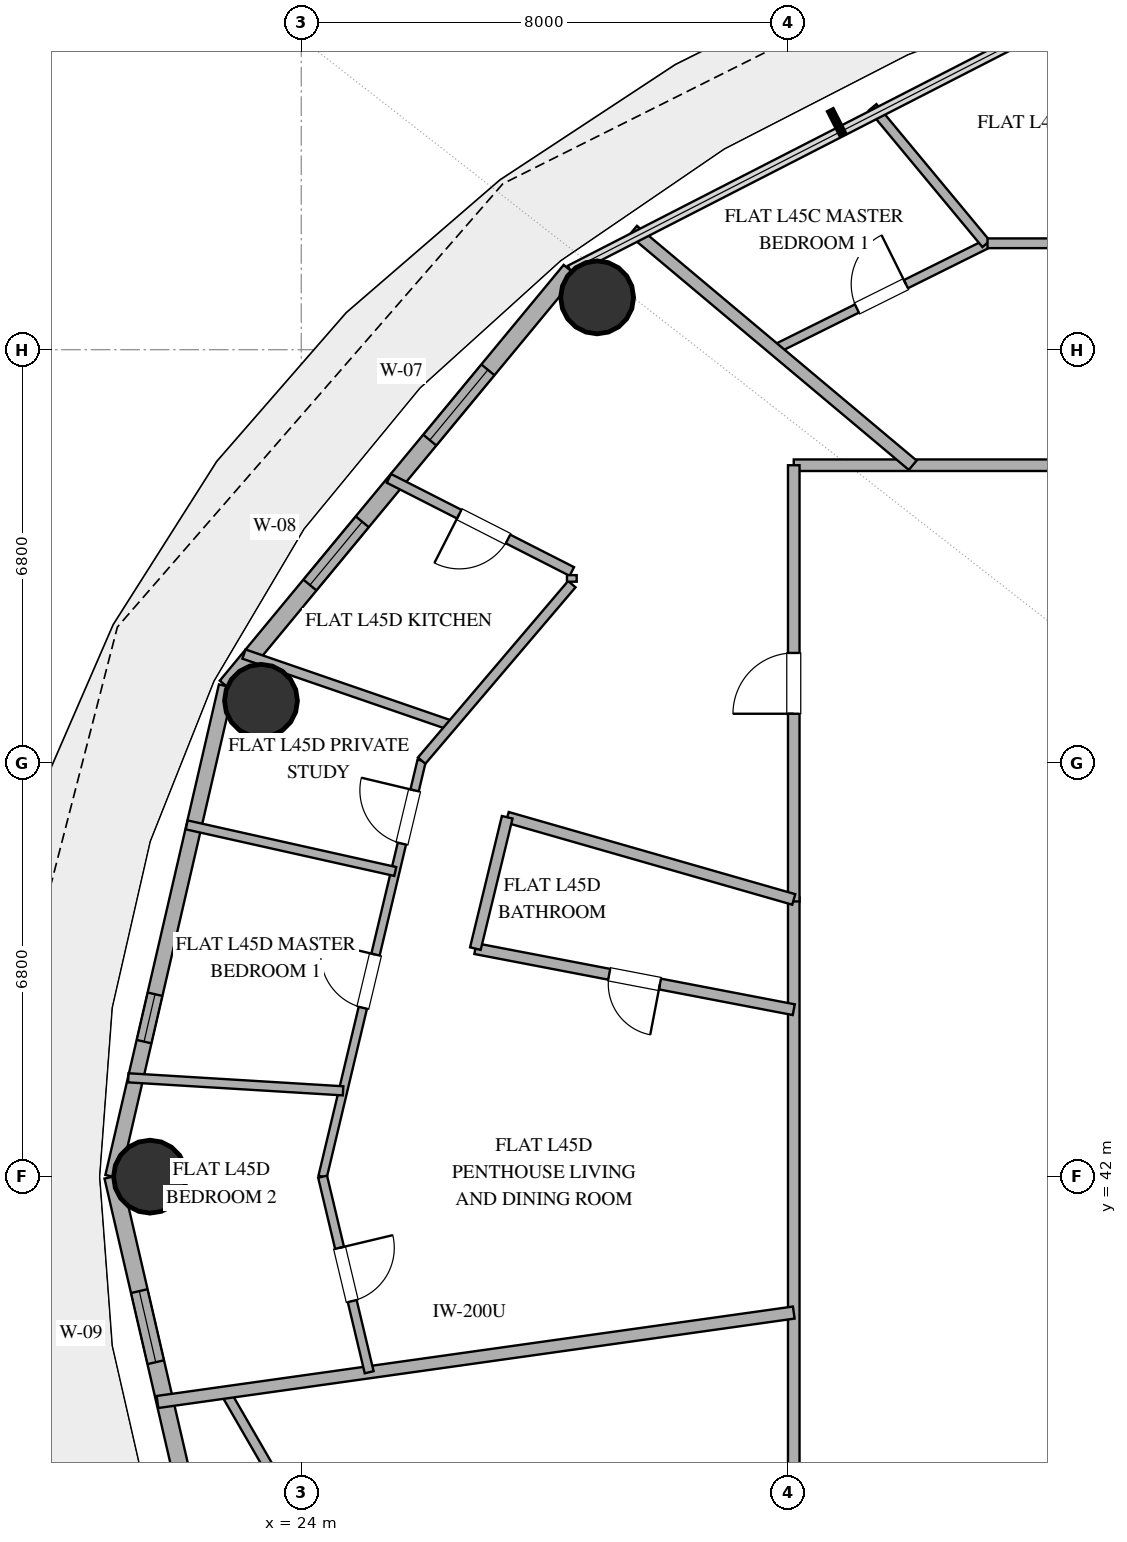
"""IFC4 building model, lengths in metres.
Left out: names, types, materials, properties, quantities, classifications, styles, units other than length and angle.
Written with IfcOpenShell. Run it as: python <this file> out.ifc"""

import sys

from ifc_helpers import new_model, si_unit, direction, frame, frame_2d, origin, origin_2d, place, context, subcontext, project, spatial, rectangle, hollow_circle, extrude, element, fill, save


model = new_model("IFC4")
c1 = context("Model", 3, precision=1e-05, world=origin(), true_north=direction((0.0, 1.0)))
c2 = subcontext(c1, "Body", "Model", "MODEL_VIEW")
j1 = project(units=[si_unit("LENGTHUNIT", "METRE"), si_unit("PLANEANGLEUNIT", "RADIAN")], contexts=[c1])
p1 = place(None, origin())
s1 = spatial("IfcSite", under=j1, at=p1, CompositionType="ELEMENT")
p2 = place(p1, origin())
s2 = spatial("IfcBuilding", under=s1, at=p2, CompositionType="ELEMENT")
p3 = place(p2, frame((0.0, 0.0, 179.4)))
s3 = spatial("IfcBuildingStorey", under=s2, at=p3, CompositionType="ELEMENT", Elevation=179.4)
for number, where, z_axis, x_axis in (
    (1, (28.866, 56.46, 0.0), (0.0, 0.0, 1.0), (1.0, 0.0, 0.0)),
    (2, (23.338, 49.826, 0.0), (0.0, 0.0, 1.0), (1.0, 0.0, 0.0)),
    (3, (21.513, 42.0, 0.0), (0.0, 0.0, 1.0), (1.0, 0.0, 0.0)),
):
    element("IfcColumn", number, at=place(p3, frame(where, z_axis=z_axis, x_axis=x_axis)), inside=s3, PredefinedType="COLUMN", context=c2, shape_type="SweptSolid", body=[
        extrude(hollow_circle(Radius=0.6, WallThickness=0.032, at=origin_2d()), origin(), (0.0, 0.0, 1.0), 3.38),
    ])
p4 = place(p3, frame((28.424, 56.906, 0.0), z_axis=(0.0, 0.0, 1.0), x_axis=(-0.637333477683, -0.770588111915, 0.0)))
e4 = element("IfcWall", 4, at=p4, inside=s3, PredefinedType="SOLIDWALL", context=c2, shape_type="SweptSolid", body=[
    extrude(rectangle(XDim=8.875, YDim=0.28, at=frame_2d((4.438, 0.0))), origin(), (0.0, 0.0, 1.0), 3.38),
])
p5 = place(p4, frame((2.125, 0.0, 0.85)))
e5 = element("IfcOpeningElement", 5, at=p5, cuts=e4, PredefinedType="OPENING", context=c2, shape_type="SweptSolid", body=[
    extrude(rectangle(XDim=1.5, YDim=1.8, at=frame_2d((0.75, 0.9))), frame((0.0, 0.15, 0.0), z_axis=(0.0, -1.0, 0.0), x_axis=(1.0, 0.0, 0.0)), (0.0, 0.0, 1.0), 0.3),
])
p6 = place(p4, frame((5.367, 0.0, 0.85)))
e6 = element("IfcOpeningElement", 6, at=p6, cuts=e4, PredefinedType="OPENING", context=c2, shape_type="SweptSolid", body=[
    extrude(rectangle(XDim=1.35, YDim=1.8, at=frame_2d((0.675, 0.9))), frame((0.0, 0.15, 0.0), z_axis=(0.0, -1.0, 0.0), x_axis=(1.0, 0.0, 0.0)), (0.0, 0.0, 1.0), 0.3),
])
p7 = place(p3, frame((22.768, 50.067, 0.0), z_axis=(0.0, 0.0, 1.0), x_axis=(-0.225473184558, -0.974249374157, 0.0)))
e7 = element("IfcWall", 7, at=p7, inside=s3, PredefinedType="SOLIDWALL", context=c2, shape_type="SweptSolid", body=[
    extrude(rectangle(XDim=8.28, YDim=0.25, at=frame_2d((4.14, 0.0))), origin(), (0.0, 0.0, 1.0), 3.38),
])
p8 = place(p7, frame((5.2, 0.0, 1.54)))
e8 = element("IfcOpeningElement", 8, at=p8, cuts=e7, PredefinedType="OPENING", context=c2, shape_type="SweptSolid", body=[
    extrude(rectangle(XDim=0.8, YDim=1.0, at=frame_2d((0.4, 0.5))), frame((0.0, 0.135, 0.0), z_axis=(0.0, -1.0, 0.0), x_axis=(1.0, 0.0, 0.0)), (0.0, 0.0, 1.0), 0.27),
])
p9 = place(p3, frame((20.901, 42.0, 0.0), z_axis=(0.0, 0.0, 1.0), x_axis=(0.225473184558, -0.974249374157, 0.0)))
e9 = element("IfcWall", 9, at=p9, inside=s3, PredefinedType="SOLIDWALL", context=c2, shape_type="SweptSolid", body=[
    extrude(rectangle(XDim=8.28, YDim=0.28, at=frame_2d((4.14, 0.0))), origin(), (0.0, 0.0, 1.0), 3.38),
])
p10 = place(p9, frame((1.932, 0.0, 0.85)))
e10 = element("IfcOpeningElement", 10, at=p10, cuts=e9, PredefinedType="OPENING", context=c2, shape_type="SweptSolid", body=[
    extrude(rectangle(XDim=1.2, YDim=1.8, at=frame_2d((0.6, 0.9))), frame((0.0, 0.15, 0.0), z_axis=(0.0, -1.0, 0.0), x_axis=(1.0, 0.0, 0.0)), (0.0, 0.0, 1.0), 0.3),
])
p11 = place(p9, frame((5.694, 0.0, 0.0)))
e11 = element("IfcOpeningElement", 11, at=p11, cuts=e9, PredefinedType="OPENING", context=c2, shape_type="SweptSolid", body=[
    extrude(rectangle(XDim=1.05, YDim=2.2, at=frame_2d((0.525, 1.1))), frame((0.0, 0.15, 0.0), z_axis=(0.0, -1.0, 0.0), x_axis=(1.0, 0.0, 0.0)), (0.0, 0.0, 1.0), 0.3),
])
p12 = place(p3, frame((32.1, 53.7, 0.0), z_axis=(0.0, 0.0, 1.0), x_axis=(1.0, 0.0, 0.0)))
e12 = element("IfcWall", 12, at=p12, inside=s3, PredefinedType="PARTITIONING", context=c2, shape_type="SweptSolid", body=[
    extrude(rectangle(XDim=16.061, YDim=0.19, at=frame_2d((8.03, 0.0))), origin(), (0.0, 0.0, 1.0), 2.74),
])
p13 = place(p12, frame((6.907, 0.0, 0.0)))
e13 = element("IfcOpeningElement", 13, at=p13, cuts=e12, PredefinedType="OPENING", context=c2, shape_type="SweptSolid", body=[
    extrude(rectangle(XDim=1.0, YDim=2.2, at=frame_2d((0.5, 1.1))), frame((0.0, 0.105, 0.0), z_axis=(0.0, -1.0, 0.0), x_axis=(1.0, 0.0, 0.0)), (0.0, 0.0, 1.0), 0.21),
])
p14 = place(p3, frame((22.753, 38.452, 0.0), z_axis=(0.0, 0.0, 1.0), x_axis=(0.500584533727, -0.865687659952, 0.0)))
e14 = element("IfcWall", 14, at=p14, inside=s3, PredefinedType="PLUMBINGWALL", context=c2, shape_type="SweptSolid", body=[
    extrude(rectangle(XDim=9.567, YDim=0.16, at=frame_2d((4.783, 0.0))), origin(), (0.0, 0.0, 1.0), 2.74),
])
p15 = place(p14, frame((5.233, 0.0, 0.0)))
e15 = element("IfcOpeningElement", 15, at=p15, cuts=e14, PredefinedType="OPENING", context=c2, shape_type="SweptSolid", body=[
    extrude(rectangle(XDim=0.9, YDim=2.1, at=frame_2d((0.45, 1.05))), frame((0.0, 0.09, 0.0), z_axis=(0.0, -1.0, 0.0), x_axis=(1.0, 0.0, 0.0)), (0.0, 0.0, 1.0), 0.18),
])
p16 = place(p3, frame((32.1, 46.593, 0.0), z_axis=(0.0, 0.0, 1.0), x_axis=(0.0, -1.0, 0.0)))
e16 = element("IfcWall", 16, at=p16, inside=s3, PredefinedType="PARTITIONING", context=c2, shape_type="SweptSolid", body=[
    extrude(rectangle(XDim=16.292, YDim=0.19, at=frame_2d((8.146, 0.0))), origin(), (0.0, 0.0, 1.0), 2.74),
])
p17 = place(p3, frame((32.1, 46.526, 0.0), z_axis=(0.0, 0.0, 1.0), x_axis=(0.0, 1.0, 0.0)))
e17 = element("IfcWall", 17, at=p17, inside=s3, PredefinedType="PARTITIONING", context=c2, shape_type="SweptSolid", body=[
    extrude(rectangle(XDim=7.174, YDim=0.19, at=frame_2d((3.587, 0.0))), origin(), (0.0, 0.0, 1.0), 2.74),
])
p18 = place(p17, frame((3.087, 0.0, 0.0)))
e18 = element("IfcOpeningElement", 18, at=p18, cuts=e17, PredefinedType="OPENING", context=c2, shape_type="SweptSolid", body=[
    extrude(rectangle(XDim=1.0, YDim=2.2, at=frame_2d((0.5, 1.1))), frame((0.0, 0.105, 0.0), z_axis=(0.0, -1.0, 0.0), x_axis=(1.0, 0.0, 0.0)), (0.0, 0.0, 1.0), 0.21),
])
p19 = place(p3, frame((21.635, 38.295, 0.0), z_axis=(0.0, 0.0, 1.0), x_axis=(0.990268074466, 0.139173060229, 0.0)))
e19 = element("IfcWall", 19, at=p19, inside=s3, PredefinedType="PARTITIONING", context=c2, shape_type="SweptSolid", body=[
    extrude(rectangle(XDim=10.567, YDim=0.2, at=frame_2d((5.284, 0.0))), origin(), (0.0, 0.0, 1.0), 2.74),
])
p20 = place(p3, frame((32.1, 44.746, 0.0), z_axis=(0.0, 0.0, 1.0), x_axis=(-0.982104947805, 0.188334467098, 0.0)))
e20 = element("IfcWall", 20, at=p20, inside=s3, PredefinedType="PLUMBINGWALL", context=c2, shape_type="SweptSolid", body=[
    extrude(rectangle(XDim=5.332, YDim=0.18, at=frame_2d((2.666, 0.0))), origin(), (0.0, 0.0, 1.0), 2.74),
])
p21 = place(p20, frame((2.241, 0.0, 0.0)))
e21 = element("IfcOpeningElement", 21, at=p21, cuts=e20, PredefinedType="OPENING", context=c2, shape_type="SweptSolid", body=[
    extrude(rectangle(XDim=0.85, YDim=2.1, at=frame_2d((0.425, 1.05))), frame((0.0, 0.1, 0.0), z_axis=(0.0, -1.0, 0.0), x_axis=(1.0, 0.0, 0.0)), (0.0, 0.0, 1.0), 0.2),
])
p22 = place(p3, frame((27.387, 47.911, 0.0), z_axis=(0.0, 0.0, 1.0), x_axis=(0.961266088446, -0.27562203686, 0.0)))
e22 = element("IfcWall", 22, at=p22, inside=s3, PredefinedType="PLUMBINGWALL", context=c2, shape_type="SweptSolid", body=[
    extrude(rectangle(XDim=4.903, YDim=0.18, at=frame_2d((2.451, 0.0))), origin(), (0.0, 0.0, 1.0), 2.74),
])
p23 = place(p3, frame((31.786, 55.605, 0.0), z_axis=(0.0, 0.0, 1.0), x_axis=(0.895458573673, 0.445144856013, 0.0)))
e23 = element("IfcWall", 23, at=p23, inside=s3, PredefinedType="PARTITIONING", context=c2, shape_type="SweptSolid", body=[
    extrude(rectangle(XDim=3.92, YDim=0.15, at=frame_2d((1.96, 0.0))), origin(), (0.0, 0.0, 1.0), 2.74),
])
p24 = place(p23, frame((1.51, 0.0, 0.0)))
e24 = element("IfcOpeningElement", 24, at=p24, cuts=e23, PredefinedType="OPENING", context=c2, shape_type="SweptSolid", body=[
    extrude(rectangle(XDim=0.9, YDim=2.1, at=frame_2d((0.45, 1.05))), frame((0.0, 0.085, 0.0), z_axis=(0.0, -1.0, 0.0), x_axis=(1.0, 0.0, 0.0)), (0.0, 0.0, 1.0), 0.17),
])
p25 = place(p3, frame((24.351, 42.0, 0.0), z_axis=(0.0, 0.0, 1.0), x_axis=(0.231658068135, 0.972797275627, 0.0)))
e25 = element("IfcWall", 25, at=p25, inside=s3, PredefinedType="PARTITIONING", context=c2, shape_type="SweptSolid", body=[
    extrude(rectangle(XDim=7.034, YDim=0.14, at=frame_2d((3.517, 0.0))), origin(), (0.0, 0.0, 1.0), 2.74),
])
p26 = place(p25, frame((2.855, 0.0, 0.0)))
e26 = element("IfcOpeningElement", 26, at=p26, cuts=e25, PredefinedType="OPENING", context=c2, shape_type="SweptSolid", body=[
    extrude(rectangle(XDim=0.9, YDim=2.1, at=frame_2d((0.45, 1.05))), frame((0.0, 0.08, 0.0), z_axis=(0.0, -1.0, 0.0), x_axis=(1.0, 0.0, 0.0)), (0.0, 0.0, 1.0), 0.16),
])
p27 = place(p25, frame((5.63, 0.0, 0.0)))
e27 = element("IfcOpeningElement", 27, at=p27, cuts=e25, PredefinedType="OPENING", context=c2, shape_type="SweptSolid", body=[
    extrude(rectangle(XDim=0.9, YDim=2.1, at=frame_2d((0.45, 1.05))), frame((0.0, 0.08, 0.0), z_axis=(0.0, -1.0, 0.0), x_axis=(1.0, 0.0, 0.0)), (0.0, 0.0, 1.0), 0.16),
])
p28 = place(p3, frame((26.471, 49.418, 0.0), z_axis=(0.0, 0.0, 1.0), x_axis=(-0.945442677411, 0.325788495392, 0.0)))
e28 = element("IfcWall", 28, at=p28, inside=s3, PredefinedType="PLUMBINGWALL", context=c2, shape_type="SweptSolid", body=[
    extrude(rectangle(XDim=3.61, YDim=0.16, at=frame_2d((1.805, 0.0))), origin(), (0.0, 0.0, 1.0), 2.74),
])
p29 = place(p3, frame((21.156, 43.626, 0.0), z_axis=(0.0, 0.0, 1.0), x_axis=(0.998171777701, -0.060440898408, 0.0)))
e29 = element("IfcWall", 29, at=p29, inside=s3, PredefinedType="PARTITIONING", context=c2, shape_type="SweptSolid", body=[
    extrude(rectangle(XDim=3.538, YDim=0.15, at=frame_2d((1.769, 0.0))), origin(), (0.0, 0.0, 1.0), 2.74),
])
p30 = place(p3, frame((25.546, 47.019, 0.0), z_axis=(0.0, 0.0, 1.0), x_axis=(-0.975921546644, 0.218121834754, 0.0)))
e30 = element("IfcWall", 30, at=p30, inside=s3, PredefinedType="PARTITIONING", context=c2, shape_type="SweptSolid", body=[
    extrude(rectangle(XDim=3.515, YDim=0.15, at=frame_2d((1.757, 0.0))), origin(), (0.0, 0.0, 1.0), 2.74),
])
p31 = place(p3, frame((28.45, 51.952, 0.0), z_axis=(0.0, 0.0, 1.0), x_axis=(-0.891148759763, 0.453711238535, 0.0)))
e31 = element("IfcWall", 31, at=p31, inside=s3, PredefinedType="PLUMBINGWALL", context=c2, shape_type="SweptSolid", body=[
    extrude(rectangle(XDim=3.375, YDim=0.16, at=frame_2d((1.688, 0.0))), origin(), (0.0, 0.0, 1.0), 2.74),
])
p32 = place(p31, frame((1.178, 0.0, 0.0)))
e32 = element("IfcOpeningElement", 32, at=p32, cuts=e31, PredefinedType="OPENING", context=c2, shape_type="SweptSolid", body=[
    extrude(rectangle(XDim=0.9, YDim=2.1, at=frame_2d((0.45, 1.05))), frame((0.0, 0.09, 0.0), z_axis=(0.0, -1.0, 0.0), x_axis=(1.0, 0.0, 0.0)), (0.0, 0.0, 1.0), 0.18),
])
p33 = place(p3, frame((24.351, 42.0, 0.0), z_axis=(0.0, 0.0, 1.0), x_axis=(0.231590575549, -0.972813345569, 0.0)))
e33 = element("IfcWall", 33, at=p33, inside=s3, PredefinedType="PARTITIONING", context=c2, shape_type="SweptSolid", body=[
    extrude(rectangle(XDim=3.306, YDim=0.15, at=frame_2d((1.653, 0.0))), origin(), (0.0, 0.0, 1.0), 2.74),
])
p34 = place(p33, frame((1.203, 0.0, 0.0)))
e34 = element("IfcOpeningElement", 34, at=p34, cuts=e33, PredefinedType="OPENING", context=c2, shape_type="SweptSolid", body=[
    extrude(rectangle(XDim=0.9, YDim=2.1, at=frame_2d((0.45, 1.05))), frame((0.0, 0.085, 0.0), z_axis=(0.0, -1.0, 0.0), x_axis=(1.0, 0.0, 0.0)), (0.0, 0.0, 1.0), 0.17),
])
p35 = place(p3, frame((25.981, 48.842, 0.0), z_axis=(0.0, 0.0, 1.0), x_axis=(0.648022171798, 0.761621470849, 0.0)))
e35 = element("IfcWall", 35, at=p35, inside=s3, PredefinedType="PLUMBINGWALL", context=c2, shape_type="SweptSolid", body=[
    extrude(rectangle(XDim=3.81, YDim=0.16, at=frame_2d((1.905, 0.0))), origin(), (0.0, 0.0, 1.0), 2.74),
])
p36 = place(p3, frame((34.056, 53.7, 0.0), z_axis=(0.0, 0.0, 1.0), x_axis=(-0.766037176398, 0.642796269728, 0.0)))
e36 = element("IfcWall", 36, at=p36, inside=s3, PredefinedType="PARTITIONING", context=c2, shape_type="SweptSolid", body=[
    extrude(rectangle(XDim=6.004, YDim=0.2, at=frame_2d((3.002, 0.0))), origin(), (0.0, 0.0, 1.0), 2.74),
])
p37 = place(p3, frame((35.264, 57.339, 0.0), z_axis=(0.0, 0.0, 1.0), x_axis=(-0.638753509407, 0.769411433643, 0.0)))
e37 = element("IfcWall", 37, at=p37, inside=s3, PredefinedType="PLUMBINGWALL", context=c2, shape_type="SweptSolid", body=[
    extrude(rectangle(XDim=2.922, YDim=0.16, at=frame_2d((1.461, 0.0))), origin(), (0.0, 0.0, 1.0), 2.74),
])
p38 = place(p3, frame((26.864, 45.75, 0.0), z_axis=(0.0, 0.0, 1.0), x_axis=(0.235499423966, 0.971874488456, 0.0)))
e38 = element("IfcWall", 38, at=p38, inside=s3, PredefinedType="PLUMBINGWALL", context=c2, shape_type="SweptSolid", body=[
    extrude(rectangle(XDim=2.223, YDim=0.18, at=frame_2d((1.111, 0.0))), origin(), (0.0, 0.0, 1.0), 2.74),
])
p39 = place(p3, frame((36.349, 57.35, 0.0), z_axis=(0.0, 0.0, 1.0), x_axis=(-1.0, 0.0, 0.0)))
e39 = element("IfcWall", 39, at=p39, inside=s3, PredefinedType="PLUMBINGWALL", context=c2, shape_type="SweptSolid", body=[
    extrude(rectangle(XDim=1.062, YDim=0.16, at=frame_2d((0.531, 0.0))), origin(), (0.0, 0.0, 1.0), 2.74),
])
p40 = place(p3, frame((28.45, 51.784, 0.0), z_axis=(0.0, 0.0, 1.0), x_axis=(0.0, 1.0, 0.0)))
e40 = element("IfcWall", 40, at=p40, inside=s3, PredefinedType="PLUMBINGWALL", context=c2, shape_type="SweptSolid", body=[
    extrude(rectangle(XDim=0.108, YDim=0.16, at=frame_2d((0.054, 0.0))), origin(), (0.0, 0.0, 1.0), 2.74),
])
p41 = place(p5, origin())
e41 = element("IfcWindow", 41, at=p41, inside=s3, PartitioningType="SINGLE_PANEL", PredefinedType="WINDOW", context=c2, shape_type="SweptSolid", body=[
    extrude(rectangle(XDim=1.5, YDim=1.8, at=frame_2d((0.75, 0.9))), frame((0.0, 0.03, 0.0), z_axis=(0.0, -1.0, 0.0), x_axis=(1.0, 0.0, 0.0)), (0.0, 0.0, 1.0), 0.06),
])
fill(e5, e41)
p42 = place(p6, origin())
e42 = element("IfcWindow", 42, at=p42, inside=s3, PartitioningType="SINGLE_PANEL", PredefinedType="WINDOW", context=c2, shape_type="SweptSolid", body=[
    extrude(rectangle(XDim=1.35, YDim=1.8, at=frame_2d((0.675, 0.9))), frame((0.0, 0.03, 0.0), z_axis=(0.0, -1.0, 0.0), x_axis=(1.0, 0.0, 0.0)), (0.0, 0.0, 1.0), 0.06),
])
fill(e6, e42)
p43 = place(p10, origin())
e43 = element("IfcWindow", 43, at=p43, inside=s3, PartitioningType="SINGLE_PANEL", PredefinedType="WINDOW", context=c2, shape_type="SweptSolid", body=[
    extrude(rectangle(XDim=1.2, YDim=1.8, at=frame_2d((0.6, 0.9))), frame((0.0, 0.03, 0.0), z_axis=(0.0, -1.0, 0.0), x_axis=(1.0, 0.0, 0.0)), (0.0, 0.0, 1.0), 0.06),
])
fill(e10, e43)
p44 = place(p8, origin())
e44 = element("IfcWindow", 44, at=p44, inside=s3, PartitioningType="SINGLE_PANEL", PredefinedType="WINDOW", context=c2, shape_type="SweptSolid", body=[
    extrude(rectangle(XDim=0.8, YDim=1.0, at=frame_2d((0.4, 0.5))), frame((0.0, 0.03, 0.0), z_axis=(0.0, -1.0, 0.0), x_axis=(1.0, 0.0, 0.0)), (0.0, 0.0, 1.0), 0.06),
])
fill(e8, e44)
p45 = place(p18, origin())
e45 = element("IfcDoor", 45, at=p45, inside=s3, OperationType="SINGLE_SWING_LEFT", PredefinedType="DOOR", context=c2, shape_type="SweptSolid", body=[
    extrude(rectangle(XDim=1.0, YDim=2.2, at=frame_2d((0.5, 1.1))), frame((0.0, 0.025, 0.0), z_axis=(0.0, -1.0, 0.0), x_axis=(1.0, 0.0, 0.0)), (0.0, 0.0, 1.0), 0.05),
])
fill(e18, e45)
p46 = place(p21, origin())
e46 = element("IfcDoor", 46, at=p46, inside=s3, OperationType="SINGLE_SWING_LEFT", PredefinedType="DOOR", context=c2, shape_type="SweptSolid", body=[
    extrude(rectangle(XDim=0.85, YDim=2.1, at=frame_2d((0.425, 1.05))), frame((0.0, 0.025, 0.0), z_axis=(0.0, -1.0, 0.0), x_axis=(1.0, 0.0, 0.0)), (0.0, 0.0, 1.0), 0.05),
])
fill(e21, e46)
p47 = place(p24, origin())
e47 = element("IfcDoor", 47, at=p47, inside=s3, OperationType="SINGLE_SWING_RIGHT", PredefinedType="DOOR", context=c2, shape_type="SweptSolid", body=[
    extrude(rectangle(XDim=0.9, YDim=2.1, at=frame_2d((0.45, 1.05))), frame((0.0, 0.025, 0.0), z_axis=(0.0, -1.0, 0.0), x_axis=(1.0, 0.0, 0.0)), (0.0, 0.0, 1.0), 0.05),
])
fill(e24, e47)
p48 = place(p26, origin())
e48 = element("IfcDoor", 48, at=p48, inside=s3, OperationType="SINGLE_SWING_RIGHT", PredefinedType="DOOR", context=c2, shape_type="SweptSolid", body=[
    extrude(rectangle(XDim=0.9, YDim=2.1, at=frame_2d((0.45, 1.05))), frame((0.0, 0.025, 0.0), z_axis=(0.0, -1.0, 0.0), x_axis=(1.0, 0.0, 0.0)), (0.0, 0.0, 1.0), 0.05),
])
fill(e26, e48)
p49 = place(p27, origin())
e49 = element("IfcDoor", 49, at=p49, inside=s3, OperationType="SINGLE_SWING_RIGHT", PredefinedType="DOOR", context=c2, shape_type="SweptSolid", body=[
    extrude(rectangle(XDim=0.9, YDim=2.1, at=frame_2d((0.45, 1.05))), frame((0.0, 0.025, 0.0), z_axis=(0.0, -1.0, 0.0), x_axis=(1.0, 0.0, 0.0)), (0.0, 0.0, 1.0), 0.05),
])
fill(e27, e49)
p50 = place(p32, origin())
e50 = element("IfcDoor", 50, at=p50, inside=s3, OperationType="SINGLE_SWING_RIGHT", PredefinedType="DOOR", context=c2, shape_type="SweptSolid", body=[
    extrude(rectangle(XDim=0.9, YDim=2.1, at=frame_2d((0.45, 1.05))), frame((0.0, 0.025, 0.0), z_axis=(0.0, -1.0, 0.0), x_axis=(1.0, 0.0, 0.0)), (0.0, 0.0, 1.0), 0.05),
])
fill(e32, e50)
p51 = place(p34, origin())
e51 = element("IfcDoor", 51, at=p51, inside=s3, OperationType="SINGLE_SWING_LEFT", PredefinedType="DOOR", context=c2, shape_type="SweptSolid", body=[
    extrude(rectangle(XDim=0.9, YDim=2.1, at=frame_2d((0.45, 1.05))), frame((0.0, 0.025, 0.0), z_axis=(0.0, -1.0, 0.0), x_axis=(1.0, 0.0, 0.0)), (0.0, 0.0, 1.0), 0.05),
])
fill(e34, e51)
save(model, sys.argv[1])
